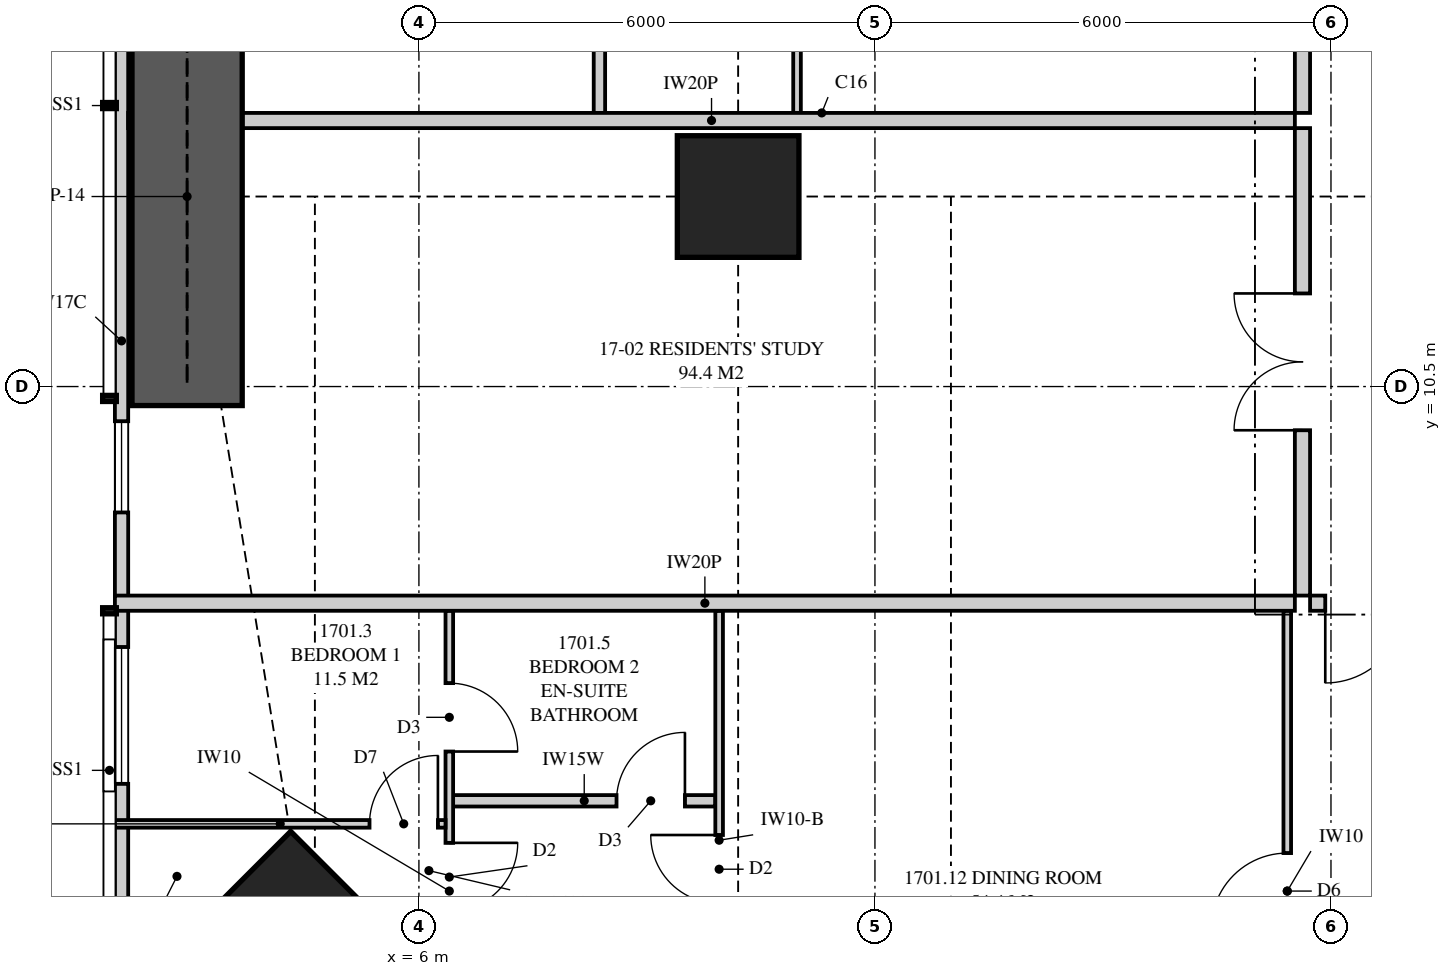
"""IFC4 building model, lengths in metres.
Left out: names, types, materials, properties, quantities, classifications, styles, units other than length and angle.
Written with IfcOpenShell. Run it as: python <this file> out.ifc"""

import sys

from ifc_helpers import new_model, si_unit, direction, frame, frame_2d, origin, origin_2d, place, context, subcontext, project, spatial, polyline, rectangle, outline, extrude, element, fill, save


model = new_model("IFC4")
c1 = context("Model", 3, precision=1e-05, world=origin(), true_north=direction((0.0, 1.0)))
c2 = subcontext(c1, "Body", "Model", "MODEL_VIEW")
j1 = project(units=[si_unit("LENGTHUNIT", "METRE"), si_unit("PLANEANGLEUNIT", "RADIAN")], contexts=[c1])
p1 = place(None, origin())
s1 = spatial("IfcSite", under=j1, at=p1, CompositionType="ELEMENT")
p2 = place(p1, origin())
s2 = spatial("IfcBuilding", under=s1, at=p2, CompositionType="ELEMENT")
p3 = place(p2, frame((0.0, 0.0, 64.55)))
s3 = spatial("IfcBuildingStorey", under=s2, at=p3, CompositionType="ELEMENT", Elevation=64.55)
p4 = place(p3, frame((4.631, 2.631, 0.0), z_axis=(0.0, 0.0, 1.0), x_axis=(0.707106781187, 0.707106781187, 0.0)))
e1 = element("IfcColumn", 1, at=p4, inside=s3, PredefinedType="COLUMN", context=c2, shape_type="SweptSolid", body=[
    extrude(rectangle(XDim=2.4, YDim=3.3, at=origin_2d()), origin(), (0.0, 0.0, 1.0), 3.35),
])
p5 = place(p3, frame((10.2, 13.0, 0.0), z_axis=(0.0, 0.0, 1.0), x_axis=(1.0, 0.0, 0.0)))
e2 = element("IfcColumn", 2, at=p5, inside=s3, PredefinedType="COLUMN", context=c2, shape_type="SweptSolid", body=[
    extrude(rectangle(XDim=1.6, YDim=1.6, at=origin_2d()), origin(), (0.0, 0.0, 1.0), 3.35),
])
p6 = place(p3, frame((2.087, 19.15, 0.0), z_axis=(0.0, 0.0, 1.0), x_axis=(0.0, -1.0, 0.0)))
e3 = element("IfcWall", 3, at=p6, inside=s3, PredefinedType="SOLIDWALL", context=c2, shape_type="SweptSolid", body=[
    extrude(outline(polyline([(0.0, 0.0), (16.099, 0.0), (16.099, 3.11), (6.369, 3.11), (6.369, 2.15), (6.276, 2.15), (6.276, 3.11), (6.15, 3.11), (6.15, 2.15), (0.0, 2.15), (0.0, 0.0)])), frame((0.0, 0.087, 0.0), z_axis=(0.0, -1.0, 0.0), x_axis=(1.0, 0.0, 0.0)), (0.0, 0.0, 1.0), 0.175),
])
p7 = place(p6, frame((1.488, 0.0, 0.4)))
e4 = element("IfcOpeningElement", 4, at=p7, cuts=e3, PredefinedType="OPENING", context=c2, shape_type="SweptSolid", body=[
    extrude(rectangle(XDim=1.8, YDim=1.7, at=frame_2d((0.9, 0.85))), frame((0.0, 0.097, 0.0), z_axis=(0.0, -1.0, 0.0), x_axis=(1.0, 0.0, 0.0)), (0.0, 0.0, 1.0), 0.195),
])
p8 = place(p6, frame((9.106, 0.0, 0.4)))
e5 = element("IfcOpeningElement", 5, at=p8, cuts=e3, PredefinedType="OPENING", context=c2, shape_type="SweptSolid", body=[
    extrude(rectangle(XDim=1.2, YDim=1.7, at=frame_2d((0.6, 0.85))), frame((0.0, 0.097, 0.0), z_axis=(0.0, -1.0, 0.0), x_axis=(1.0, 0.0, 0.0)), (0.0, 0.0, 1.0), 0.195),
])
p9 = place(p6, frame((12.077, 0.0, 0.4)))
e6 = element("IfcOpeningElement", 6, at=p9, cuts=e3, PredefinedType="OPENING", context=c2, shape_type="SweptSolid", body=[
    extrude(rectangle(XDim=1.8, YDim=1.7, at=frame_2d((0.9, 0.85))), frame((0.0, 0.097, 0.0), z_axis=(0.0, -1.0, 0.0), x_axis=(1.0, 0.0, 0.0)), (0.0, 0.0, 1.0), 0.195),
])
p10 = place(p3, frame((17.725, 7.65, 0.0), z_axis=(0.0, 0.0, 1.0), x_axis=(1.0, 0.0, 0.0)))
e7 = element("IfcWall", 7, at=p10, inside=s3, PredefinedType="PARTITIONING", context=c2, shape_type="SweptSolid", body=[
    extrude(outline(polyline([(0.0, 0.0), (16.075, 0.0), (16.075, 3.11), (6.612, 3.11), (6.612, 2.541), (5.938, 2.541), (5.938, 3.11), (0.0, 3.11), (0.0, 0.0)])), frame((0.0, 0.1, 0.0), z_axis=(0.0, -1.0, 0.0), x_axis=(1.0, 0.0, 0.0)), (0.0, 0.0, 1.0), 0.2),
])
p11 = place(p10, frame((0.2, 0.0, 0.0)))
e8 = element("IfcOpeningElement", 8, at=p11, cuts=e7, PredefinedType="OPENING", context=c2, shape_type="SweptSolid", body=[
    extrude(rectangle(XDim=1.05, YDim=2.2, at=frame_2d((0.525, 1.1))), frame((0.0, 0.11, 0.0), z_axis=(0.0, -1.0, 0.0), x_axis=(1.0, 0.0, 0.0)), (0.0, 0.0, 1.0), 0.22),
])
p12 = place(p3, frame((6.4, 0.175, 0.0), z_axis=(0.0, 0.0, 1.0), x_axis=(0.0, 1.0, 0.0)))
e9 = element("IfcWall", 9, at=p12, inside=s3, PredefinedType="PARTITIONING", context=c2, shape_type="SweptSolid", body=[
    extrude(outline(polyline([(0.0, 0.0), (7.375, 0.0), (7.375, 3.11), (2.978, 3.11), (2.978, 2.15), (1.224, 2.15), (1.224, 3.11), (0.0, 3.11), (0.0, 0.0)])), frame((0.0, 0.05, 0.0), z_axis=(0.0, -1.0, 0.0), x_axis=(1.0, 0.0, 0.0)), (0.0, 0.0, 1.0), 0.1),
])
p13 = place(p12, frame((3.422, 0.0, 0.0)))
e10 = element("IfcOpeningElement", 10, at=p13, cuts=e9, PredefinedType="OPENING", context=c2, shape_type="SweptSolid", body=[
    extrude(rectangle(XDim=0.9, YDim=2.1, at=frame_2d((0.45, 1.05))), frame((0.0, 0.06, 0.0), z_axis=(0.0, -1.0, 0.0), x_axis=(1.0, 0.0, 0.0)), (0.0, 0.0, 1.0), 0.12),
])
p14 = place(p12, frame((5.523, 0.0, 0.0)))
e11 = element("IfcOpeningElement", 11, at=p14, cuts=e9, PredefinedType="OPENING", context=c2, shape_type="SweptSolid", body=[
    extrude(rectangle(XDim=0.9, YDim=2.1, at=frame_2d((0.45, 1.05))), frame((0.0, 0.06, 0.0), z_axis=(0.0, -1.0, 0.0), x_axis=(1.0, 0.0, 0.0)), (0.0, 0.0, 1.0), 0.12),
])
p15 = place(p3, frame((9.95, 1.513, 0.0), z_axis=(0.0, 0.0, 1.0), x_axis=(0.0, 1.0, 0.0)))
e12 = element("IfcWall", 12, at=p15, inside=s3, PredefinedType="PARTITIONING", context=c2, shape_type="SweptSolid", body=[
    extrude(outline(polyline([(0.0, 0.0), (6.037, 0.0), (6.037, 2.51), (0.927, 2.51), (0.927, 2.15), (0.0, 2.15), (0.0, 0.0)])), frame((0.0, 0.05, 0.0), z_axis=(0.0, -1.0, 0.0), x_axis=(1.0, 0.0, 0.0)), (0.0, 0.0, 1.0), 0.1),
])
p16 = place(p15, frame((2.188, 0.0, 0.0)))
e13 = element("IfcOpeningElement", 13, at=p16, cuts=e12, PredefinedType="OPENING", context=c2, shape_type="SweptSolid", body=[
    extrude(rectangle(XDim=0.9, YDim=2.1, at=frame_2d((0.45, 1.05))), frame((0.0, 0.06, 0.0), z_axis=(0.0, -1.0, 0.0), x_axis=(1.0, 0.0, 0.0)), (0.0, 0.0, 1.0), 0.12),
])
p17 = place(p3, frame((2.0, 4.747, 0.0), z_axis=(0.0, 0.0, 1.0), x_axis=(1.0, 0.0, 0.0)))
e14 = element("IfcWall", 14, at=p17, inside=s3, PredefinedType="PARTITIONING", context=c2, shape_type="SweptSolid", body=[
    extrude(outline(polyline([(0.0, 0.0), (4.35, 0.0), (4.35, 3.11), (3.16, 3.11), (3.16, 2.15), (1.417, 2.15), (1.417, 3.11), (0.0, 3.11), (0.0, 0.0)])), frame((0.0, 0.05, 0.0), z_axis=(0.0, -1.0, 0.0), x_axis=(1.0, 0.0, 0.0)), (0.0, 0.0, 1.0), 0.1),
])
p18 = place(p17, frame((3.35, 0.0, 0.0)))
e15 = element("IfcOpeningElement", 15, at=p18, cuts=e14, PredefinedType="OPENING", context=c2, shape_type="SweptSolid", body=[
    extrude(rectangle(XDim=0.9, YDim=2.1, at=frame_2d((0.45, 1.05))), frame((0.0, 0.06, 0.0), z_axis=(0.0, -1.0, 0.0), x_axis=(1.0, 0.0, 0.0)), (0.0, 0.0, 1.0), 0.12),
])
p19 = place(p3, frame((6.45, 5.05, 0.0), z_axis=(0.0, 0.0, 1.0), x_axis=(1.0, 0.0, 0.0)))
e16 = element("IfcWall", 16, at=p19, inside=s3, PredefinedType="PLUMBINGWALL", context=c2, shape_type="SweptSolid", body=[
    extrude(outline(polyline([(0.0, 0.0), (3.45, 0.0), (3.45, 3.11), (3.45, 2.51), (2.465, 2.51), (2.465, 3.11), (0.0, 3.11), (0.0, 0.0)])), frame((0.0, 0.075, 0.0), z_axis=(0.0, -1.0, 0.0), x_axis=(1.0, 0.0, 0.0)), (0.0, 0.0, 1.0), 0.15),
])
p20 = place(p19, frame((2.15, 0.0, 0.0)))
e17 = element("IfcOpeningElement", 17, at=p20, cuts=e16, PredefinedType="OPENING", context=c2, shape_type="SweptSolid", body=[
    extrude(rectangle(XDim=0.9, YDim=2.1, at=frame_2d((0.45, 1.05))), frame((0.0, 0.085, 0.0), z_axis=(0.0, -1.0, 0.0), x_axis=(1.0, 0.0, 0.0)), (0.0, 0.0, 1.0), 0.17),
])
p21 = place(p3, frame((17.425, 0.175, 0.0), z_axis=(0.0, 0.0, 1.0), x_axis=(0.0, 1.0, 0.0)))
e18 = element("IfcWall", 18, at=p21, inside=s3, PredefinedType="PARTITIONING", context=c2, shape_type="SweptSolid", body=[
    extrude(outline(polyline([(0.0, 0.0), (7.375, 0.0), (7.375, 3.11), (1.635, 3.11), (1.635, 2.15), (0.0, 2.15), (0.0, 3.11), (0.0, 0.0)])), frame((0.0, 0.05, 0.0), z_axis=(0.0, -1.0, 0.0), x_axis=(1.0, 0.0, 0.0)), (0.0, 0.0, 1.0), 0.1),
])
p22 = place(p21, frame((3.188, 0.0, 0.0)))
e19 = element("IfcOpeningElement", 19, at=p22, cuts=e18, PredefinedType="OPENING", context=c2, shape_type="SweptSolid", body=[
    extrude(rectangle(XDim=1.0, YDim=2.1, at=frame_2d((0.5, 1.05))), frame((0.0, 0.06, 0.0), z_axis=(0.0, -1.0, 0.0), x_axis=(1.0, 0.0, 0.0)), (0.0, 0.0, 1.0), 0.12),
])
p23 = place(p3, frame((2.0, 7.65, 0.0), z_axis=(0.0, 0.0, 1.0), x_axis=(1.0, 0.0, 0.0)))
e20 = element("IfcWall", 20, at=p23, inside=s3, PredefinedType="PARTITIONING", context=c2, shape_type="SweptSolid", body=[
    extrude(outline(polyline([(0.0, 0.0), (15.525, 0.0), (15.525, 3.11), (11.337, 3.11), (11.337, 2.541), (10.663, 2.541), (10.663, 3.11), (9.51, 3.11), (9.51, 2.51), (6.89, 2.51), (6.89, 3.11), (2.969, 3.11), (2.969, 2.541), (2.74, 2.541), (2.74, 2.15), (0.896, 2.15), (0.896, 3.11), (0.0, 3.11), (0.0, 0.0)])), frame((0.0, 0.1, 0.0), z_axis=(0.0, -1.0, 0.0), x_axis=(1.0, 0.0, 0.0)), (0.0, 0.0, 1.0), 0.2),
])
p24 = place(p3, frame((2.175, 14.0, 0.0), z_axis=(0.0, 0.0, 1.0), x_axis=(1.0, 0.0, 0.0)))
e21 = element("IfcWall", 21, at=p24, inside=s3, PredefinedType="PARTITIONING", context=c2, shape_type="SweptSolid", body=[
    extrude(outline(polyline([(0.529, 2.15), (0.0, 2.15), (0.0, 0.0), (0.529, 0.0), (0.529, 0.82), (1.021, 0.82), (1.021, 0.0), (15.35, 0.0), (15.35, 3.11), (9.335, 3.11), (9.335, 2.51), (6.715, 2.51), (6.715, 3.11), (1.685, 3.11), (1.685, 2.15), (1.021, 2.15), (1.021, 1.33), (0.529, 1.33), (0.529, 2.15)])), frame((0.0, 0.1, 0.0), z_axis=(0.0, -1.0, 0.0), x_axis=(1.0, 0.0, 0.0)), (0.0, 0.0, 1.0), 0.2),
])
p25 = place(p3, frame((17.625, 7.75, 0.0), z_axis=(0.0, 0.0, 1.0), x_axis=(0.0, 1.0, 0.0)))
e22 = element("IfcWall", 22, at=p25, inside=s3, PredefinedType="PARTITIONING", context=c2, shape_type="SweptSolid", body=[
    extrude(outline(polyline([(0.0, 0.0), (6.15, 0.0), (6.15, 3.11), (5.587, 3.11), (5.587, 2.541), (4.913, 2.541), (4.913, 3.11), (0.0, 3.11), (0.0, 0.0)])), frame((0.0, 0.1, 0.0), z_axis=(0.0, -1.0, 0.0), x_axis=(1.0, 0.0, 0.0)), (0.0, 0.0, 1.0), 0.2),
])
p26 = place(p25, frame((2.175, 0.0, 0.0)))
e23 = element("IfcOpeningElement", 23, at=p26, cuts=e22, PredefinedType="OPENING", context=c2, shape_type="SweptSolid", body=[
    extrude(rectangle(XDim=1.8, YDim=2.1, at=frame_2d((0.9, 1.05))), frame((0.0, 0.11, 0.0), z_axis=(0.0, -1.0, 0.0), x_axis=(1.0, 0.0, 0.0)), (0.0, 0.0, 1.0), 0.22),
])
p27 = place(p3, frame((17.625, 14.1, 0.0), z_axis=(0.0, 0.0, 1.0), x_axis=(0.0, 1.0, 0.0)))
e24 = element("IfcWall", 24, at=p27, inside=s3, PredefinedType="PARTITIONING", context=c2, shape_type="SweptSolid", body=[
    extrude(outline(polyline([(0.0, 0.0), (15.15, 0.0), (15.15, 3.11), (11.237, 3.11), (11.237, 2.541), (10.562, 2.541), (10.562, 3.11), (0.0, 3.11), (0.0, 0.0)])), frame((0.0, 0.1, 0.0), z_axis=(0.0, -1.0, 0.0), x_axis=(1.0, 0.0, 0.0)), (0.0, 0.0, 1.0), 0.2),
])
p28 = place(p27, frame((7.075, 0.0, 0.0)))
e25 = element("IfcOpeningElement", 25, at=p28, cuts=e24, PredefinedType="OPENING", context=c2, shape_type="SweptSolid", body=[
    extrude(rectangle(XDim=1.05, YDim=2.2, at=frame_2d((0.525, 1.1))), frame((0.0, 0.11, 0.0), z_axis=(0.0, -1.0, 0.0), x_axis=(1.0, 0.0, 0.0)), (0.0, 0.0, 1.0), 0.22),
])
p29 = place(p3, frame((8.375, 14.1, 0.0), z_axis=(0.0, 0.0, 1.0), x_axis=(0.0, 1.0, 0.0)))
e26 = element("IfcWall", 26, at=p29, inside=s3, PredefinedType="PLUMBINGWALL", context=c2, shape_type="SweptSolid", body=[
    extrude(rectangle(XDim=3.95, YDim=0.15, at=frame_2d((1.975, 0.0))), origin(), (0.0, 0.0, 1.0), 3.11),
])
p30 = place(p29, frame((2.65, 0.0, 0.0)))
e27 = element("IfcOpeningElement", 27, at=p30, cuts=e26, PredefinedType="OPENING", context=c2, shape_type="SweptSolid", body=[
    extrude(rectangle(XDim=0.9, YDim=2.1, at=frame_2d((0.45, 1.05))), frame((0.0, 0.085, 0.0), z_axis=(0.0, -1.0, 0.0), x_axis=(1.0, 0.0, 0.0)), (0.0, 0.0, 1.0), 0.17),
])
p31 = place(p3, frame((10.975, 14.1, 0.0), z_axis=(0.0, 0.0, 1.0), x_axis=(0.0, 1.0, 0.0)))
e28 = element("IfcWall", 28, at=p31, inside=s3, PredefinedType="PARTITIONING", context=c2, shape_type="SweptSolid", body=[
    extrude(outline(polyline([(0.0, 0.0), (3.95, 0.0), (3.95, 3.11), (3.95, 2.51), (0.0, 2.51), (0.0, 3.11), (0.0, 0.0)])), frame((0.0, 0.05, 0.0), z_axis=(0.0, -1.0, 0.0), x_axis=(1.0, 0.0, 0.0)), (0.0, 0.0, 1.0), 0.1),
])
p32 = place(p3, frame((2.95, 10.25, 0.0), z_axis=(0.0, 0.0, 1.0), x_axis=(0.0, 1.0, 0.0)))
e29 = element("IfcWall", 29, at=p32, inside=s3, PredefinedType="SHEAR", context=c2, shape_type="SweptSolid", body=[
    extrude(rectangle(XDim=5.5, YDim=1.45, at=frame_2d((2.75, 0.0))), origin(), (0.0, 0.0, 1.0), 3.35),
])
p33 = place(p8, origin())
e30 = element("IfcWindow", 30, at=p33, inside=s3, PartitioningType="SINGLE_PANEL", PredefinedType="WINDOW", context=c2, shape_type="SweptSolid", body=[
    extrude(rectangle(XDim=1.2, YDim=1.7, at=frame_2d((0.6, 0.85))), frame((0.0, 0.03, 0.0), z_axis=(0.0, -1.0, 0.0), x_axis=(1.0, 0.0, 0.0)), (0.0, 0.0, 1.0), 0.06),
])
fill(e5, e30)
p34 = place(p9, origin())
e31 = element("IfcWindow", 31, at=p34, inside=s3, PartitioningType="SINGLE_PANEL", PredefinedType="WINDOW", context=c2, shape_type="SweptSolid", body=[
    extrude(rectangle(XDim=1.8, YDim=1.7, at=frame_2d((0.9, 0.85))), frame((0.0, 0.03, 0.0), z_axis=(0.0, -1.0, 0.0), x_axis=(1.0, 0.0, 0.0)), (0.0, 0.0, 1.0), 0.06),
])
fill(e6, e31)
p35 = place(p11, frame((1.05, 0.0, 0.0), z_axis=(0.0, 0.0, 1.0), x_axis=(-1.0, 0.0, 0.0)))
e32 = element("IfcDoor", 32, at=p35, inside=s3, OperationType="SINGLE_SWING_RIGHT", PredefinedType="DOOR", context=c2, shape_type="SweptSolid", body=[
    extrude(rectangle(XDim=1.05, YDim=2.2, at=frame_2d((0.525, 1.1))), frame((0.0, 0.025, 0.0), z_axis=(0.0, -1.0, 0.0), x_axis=(1.0, 0.0, 0.0)), (0.0, 0.0, 1.0), 0.05),
])
fill(e8, e32)
p36 = place(p18, origin())
e33 = element("IfcDoor", 33, at=p36, inside=s3, OperationType="SINGLE_SWING_RIGHT", PredefinedType="DOOR", context=c2, shape_type="SweptSolid", body=[
    extrude(rectangle(XDim=0.9, YDim=2.1, at=frame_2d((0.45, 1.05))), frame((0.0, 0.025, 0.0), z_axis=(0.0, -1.0, 0.0), x_axis=(1.0, 0.0, 0.0)), (0.0, 0.0, 1.0), 0.05),
])
fill(e15, e33)
p37 = place(p13, frame((0.9, 0.0, 0.0), z_axis=(0.0, 0.0, 1.0), x_axis=(-1.0, 0.0, 0.0)))
e34 = element("IfcDoor", 34, at=p37, inside=s3, OperationType="SINGLE_SWING_LEFT", PredefinedType="DOOR", context=c2, shape_type="SweptSolid", body=[
    extrude(rectangle(XDim=0.9, YDim=2.1, at=frame_2d((0.45, 1.05))), frame((0.0, 0.025, 0.0), z_axis=(0.0, -1.0, 0.0), x_axis=(1.0, 0.0, 0.0)), (0.0, 0.0, 1.0), 0.05),
])
fill(e10, e34)
p38 = place(p16, origin())
e35 = element("IfcDoor", 35, at=p38, inside=s3, OperationType="SINGLE_SWING_RIGHT", PredefinedType="DOOR", context=c2, shape_type="SweptSolid", body=[
    extrude(rectangle(XDim=0.9, YDim=2.1, at=frame_2d((0.45, 1.05))), frame((0.0, 0.025, 0.0), z_axis=(0.0, -1.0, 0.0), x_axis=(1.0, 0.0, 0.0)), (0.0, 0.0, 1.0), 0.05),
])
fill(e13, e35)
p39 = place(p20, origin())
e36 = element("IfcDoor", 36, at=p39, inside=s3, OperationType="SINGLE_SWING_RIGHT", PredefinedType="DOOR", context=c2, shape_type="SweptSolid", body=[
    extrude(rectangle(XDim=0.9, YDim=2.1, at=frame_2d((0.45, 1.05))), frame((0.0, 0.025, 0.0), z_axis=(0.0, -1.0, 0.0), x_axis=(1.0, 0.0, 0.0)), (0.0, 0.0, 1.0), 0.05),
])
fill(e17, e36)
p40 = place(p14, frame((0.9, 0.0, 0.0), z_axis=(0.0, 0.0, 1.0), x_axis=(-1.0, 0.0, 0.0)))
e37 = element("IfcDoor", 37, at=p40, inside=s3, OperationType="SINGLE_SWING_RIGHT", PredefinedType="DOOR", context=c2, shape_type="SweptSolid", body=[
    extrude(rectangle(XDim=0.9, YDim=2.1, at=frame_2d((0.45, 1.05))), frame((0.0, 0.025, 0.0), z_axis=(0.0, -1.0, 0.0), x_axis=(1.0, 0.0, 0.0)), (0.0, 0.0, 1.0), 0.05),
])
fill(e11, e37)
p41 = place(p22, origin())
e38 = element("IfcDoor", 38, at=p41, inside=s3, OperationType="SINGLE_SWING_LEFT", PredefinedType="DOOR", context=c2, shape_type="SweptSolid", body=[
    extrude(rectangle(XDim=1.0, YDim=2.1, at=frame_2d((0.5, 1.05))), frame((0.0, 0.025, 0.0), z_axis=(0.0, -1.0, 0.0), x_axis=(1.0, 0.0, 0.0)), (0.0, 0.0, 1.0), 0.05),
])
fill(e19, e38)
p42 = place(p26, origin())
e39 = element("IfcDoor", 39, at=p42, inside=s3, OperationType="DOUBLE_DOOR_SINGLE_SWING", PredefinedType="DOOR", context=c2, shape_type="SweptSolid", body=[
    extrude(rectangle(XDim=1.8, YDim=2.1, at=frame_2d((0.9, 1.05))), frame((0.0, 0.025, 0.0), z_axis=(0.0, -1.0, 0.0), x_axis=(1.0, 0.0, 0.0)), (0.0, 0.0, 1.0), 0.05),
])
fill(e23, e39)
save(model, sys.argv[1])
